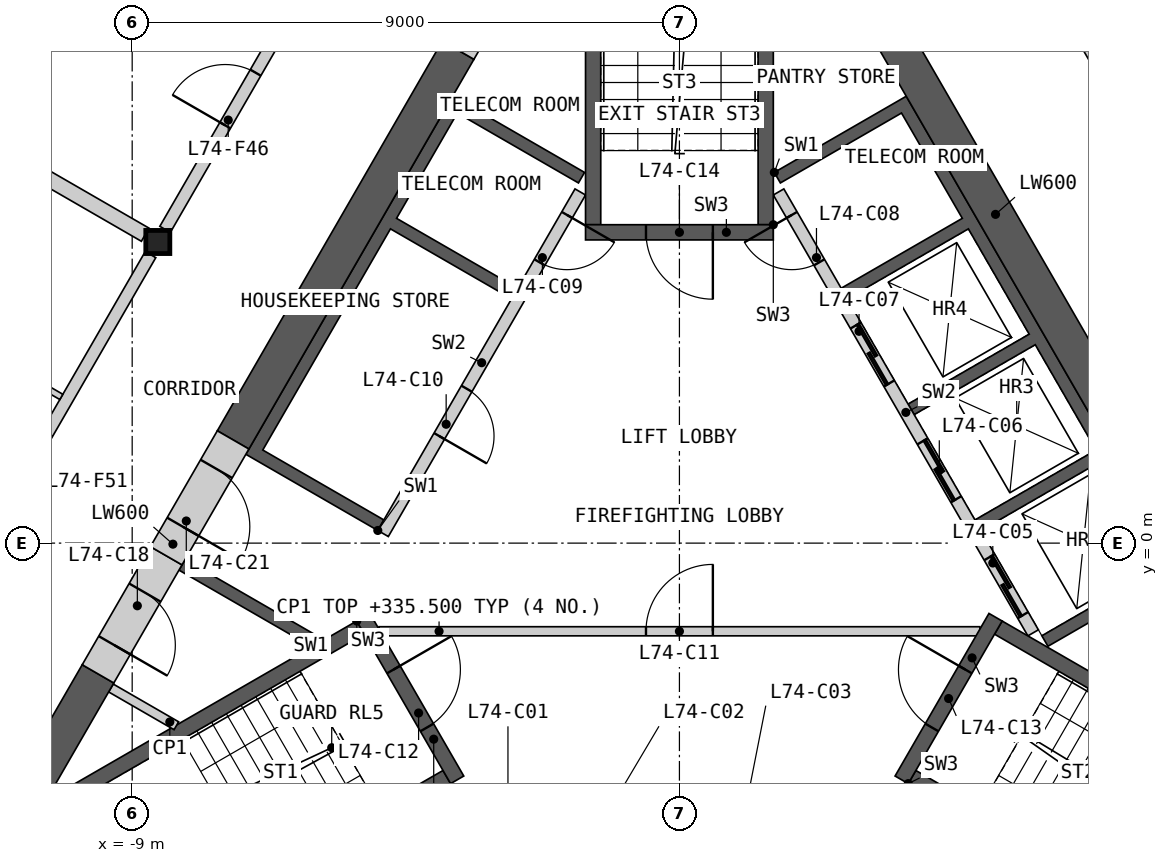
"""IFC4 building model, lengths in metres.
Left out: names, types, materials, properties, quantities, classifications, styles, units other than length and angle.
Written with IfcOpenShell. Run it as: python <this file> out.ifc"""

import sys

from ifc_helpers import new_model, si_unit, direction, frame, frame_2d, origin, origin_2d, place, context, subcontext, project, spatial, polyline, rectangle, i_section, outline, extrude, element, fill, save


model = new_model("IFC4")
c1 = context("Model", 3, precision=1e-05, world=origin(), true_north=direction((0.0, 1.0)))
c2 = subcontext(c1, "Body", "Model", "MODEL_VIEW")
j1 = project(units=[si_unit("LENGTHUNIT", "METRE"), si_unit("PLANEANGLEUNIT", "RADIAN")], contexts=[c1])
p1 = place(None, origin())
s1 = spatial("IfcSite", under=j1, at=p1, CompositionType="ELEMENT")
p2 = place(p1, origin())
s2 = spatial("IfcBuilding", under=s1, at=p2, CompositionType="ELEMENT")
p3 = place(p2, frame((0.0, 0.0, 332.4)))
s3 = spatial("IfcBuildingStorey", under=s2, at=p3, CompositionType="ELEMENT", Elevation=332.4)
p4 = place(p3, frame((-8.578, 4.953, 0.0), z_axis=(0.0, 0.0, 1.0), x_axis=(1.0, 0.0, 0.0)))
e1 = element("IfcColumn", 1, at=p4, inside=s3, PredefinedType="COLUMN", context=c2, shape_type="SweptSolid", body=[
    extrude(i_section(OverallWidth=0.396, OverallDepth=0.381, WebThickness=0.019, FlangeThickness=0.03, at=origin_2d()), origin(), (0.0, 0.0, 1.0), 3.4),
])
p5 = place(p3, origin())
e2 = element("IfcWall", 2, at=p5, inside=s3, PredefinedType="SHEAR", context=c2, shape_type="SweptSolid", body=[
    extrude(outline(polyline([(1.561, 6.097), (3.731, 7.35), (8.231, -0.444), (6.061, -1.697), (5.96, -1.524), (7.952, -0.374), (6.952, 1.358), (4.96, 0.208), (4.861, 0.381), (6.852, 1.531), (5.852, 3.263), (3.861, 2.113), (3.76, 2.287), (5.752, 3.437), (4.752, 5.169), (2.76, 4.019), (2.66, 4.192), (4.652, 5.342), (3.652, 7.074), (1.66, 5.924), (1.561, 6.097)])), origin(), (0.0, 0.0, 1.0), 3.1),
])
p6 = place(p3, frame((5.817, -1.476, 0.0), z_axis=(0.0, 0.0, 1.0), x_axis=(-0.500002616675, 0.866023893041, 0.0)))
e3 = element("IfcWall", 3, at=p6, inside=s3, PredefinedType="SOLIDWALL", context=c2, shape_type="SweptSolid", body=[
    extrude(rectangle(XDim=8.373, YDim=0.2, at=frame_2d((4.187, 0.0))), origin(), (0.0, 0.0, 1.0), 3.1),
])
p7 = place(p6, frame((0.337, 0.0, 0.0)))
e4 = element("IfcOpeningElement", 4, at=p7, cuts=e3, PredefinedType="OPENING", context=c2, shape_type="SweptSolid", body=[
    extrude(rectangle(XDim=1.1, YDim=2.1, at=frame_2d((0.55, 1.05))), frame((0.0, 0.11, 0.0), z_axis=(0.0, -1.0, 0.0), x_axis=(1.0, 0.0, 0.0)), (0.0, 0.0, 1.0), 0.22),
])
p8 = place(p6, frame((2.537, 0.0, 0.0)))
e5 = element("IfcOpeningElement", 5, at=p8, cuts=e3, PredefinedType="OPENING", context=c2, shape_type="SweptSolid", body=[
    extrude(rectangle(XDim=1.1, YDim=2.1, at=frame_2d((0.55, 1.05))), frame((0.0, 0.11, 0.0), z_axis=(0.0, -1.0, 0.0), x_axis=(1.0, 0.0, 0.0)), (0.0, 0.0, 1.0), 0.22),
])
p9 = place(p6, frame((4.737, 0.0, 0.0)))
e6 = element("IfcOpeningElement", 6, at=p9, cuts=e3, PredefinedType="OPENING", context=c2, shape_type="SweptSolid", body=[
    extrude(rectangle(XDim=1.1, YDim=2.1, at=frame_2d((0.55, 1.05))), frame((0.0, 0.11, 0.0), z_axis=(0.0, -1.0, 0.0), x_axis=(1.0, 0.0, 0.0)), (0.0, 0.0, 1.0), 0.22),
])
p10 = place(p6, frame((7.037, 0.0, 0.0)))
e7 = element("IfcOpeningElement", 7, at=p10, cuts=e3, PredefinedType="OPENING", context=c2, shape_type="SweptSolid", body=[
    extrude(rectangle(XDim=0.9, YDim=2.1, at=frame_2d((0.45, 1.05))), frame((0.0, 0.11, 0.0), z_axis=(0.0, -1.0, 0.0), x_axis=(1.0, 0.0, 0.0)), (0.0, 0.0, 1.0), 0.22),
])
p11 = place(p3, origin())
e8 = element("IfcWall", 8, at=p11, inside=s3, PredefinedType="SHEAR", context=c2, shape_type="SweptSolid", body=[
    extrude(outline(polyline([(-6.061, -1.697), (-8.231, -0.444), (-8.131, -0.271), (-5.96, -1.524), (-6.061, -1.697)])), origin(), (0.0, 0.0, 1.0), 3.1),
])
p12 = place(p3, origin())
e9 = element("IfcWall", 9, at=p12, inside=s3, PredefinedType="SHEAR", context=c2, shape_type="SweptSolid", body=[
    extrude(outline(polyline([(-4.96, 0.208), (-7.131, 1.461), (-3.731, 7.35), (-1.561, 6.097), (-1.66, 5.924), (-3.652, 7.074), (-4.652, 5.342), (-2.66, 4.192), (-2.76, 4.019), (-4.752, 5.169), (-6.852, 1.531), (-4.861, 0.381), (-4.96, 0.208)])), origin(), (0.0, 0.0, 1.0), 3.1),
])
p13 = place(p3, frame((-1.631, 5.776, 0.0), z_axis=(0.0, 0.0, 1.0), x_axis=(-0.499992876559, -0.866029516466, 0.0)))
e10 = element("IfcWall", 10, at=p13, inside=s3, PredefinedType="SOLIDWALL", context=c2, shape_type="SweptSolid", body=[
    extrude(rectangle(XDim=6.486, YDim=0.2, at=frame_2d((3.243, 0.0))), origin(), (0.0, 0.0, 1.0), 3.1),
])
p14 = place(p13, frame((0.437, 0.0, 0.0)))
e11 = element("IfcOpeningElement", 11, at=p14, cuts=e10, PredefinedType="OPENING", context=c2, shape_type="SweptSolid", body=[
    extrude(rectangle(XDim=0.9, YDim=2.1, at=frame_2d((0.45, 1.05))), frame((0.0, 0.11, 0.0), z_axis=(0.0, -1.0, 0.0), x_axis=(1.0, 0.0, 0.0)), (0.0, 0.0, 1.0), 0.22),
])
p15 = place(p13, frame((3.737, 0.0, 0.0)))
e12 = element("IfcOpeningElement", 12, at=p15, cuts=e10, PredefinedType="OPENING", context=c2, shape_type="SweptSolid", body=[
    extrude(rectangle(XDim=0.9, YDim=2.1, at=frame_2d((0.45, 1.05))), frame((0.0, 0.11, 0.0), z_axis=(0.0, -1.0, 0.0), x_axis=(1.0, 0.0, 0.0)), (0.0, 0.0, 1.0), 0.22),
])
p16 = place(p3, frame((-4.941, -1.45, 0.0), z_axis=(0.0, 0.0, 1.0), x_axis=(1.0, 0.0, 0.0)))
e13 = element("IfcWall", 13, at=p16, inside=s3, PredefinedType="PARTITIONING", context=c2, shape_type="SweptSolid", body=[
    extrude(rectangle(XDim=9.882, YDim=0.15, at=frame_2d((4.941, 0.0))), origin(), (0.0, 0.0, 1.0), 3.1),
])
p17 = place(p16, frame((4.391, 0.0, 0.0)))
e14 = element("IfcOpeningElement", 14, at=p17, cuts=e13, PredefinedType="OPENING", context=c2, shape_type="SweptSolid", body=[
    extrude(rectangle(XDim=1.1, YDim=2.1, at=frame_2d((0.55, 1.05))), frame((0.0, 0.085, 0.0), z_axis=(0.0, -1.0, 0.0), x_axis=(1.0, 0.0, 0.0)), (0.0, 0.0, 1.0), 0.17),
])
p18 = place(p3, origin())
e15 = element("IfcWall", 15, at=p18, inside=s3, PredefinedType="SHEAR", context=c2, shape_type="SweptSolid", body=[
    extrude(outline(polyline([(-5.307, -1.281), (-10.374, -4.206), (-10.032, -4.298), (-5.182, -1.498), (-5.307, -1.281)])), origin(), (0.0, 0.0, 1.0), 3.1),
])
p19 = place(p3, origin())
e16 = element("IfcWall", 16, at=p19, inside=s3, PredefinedType="SHEAR", context=c2, shape_type="SweptSolid", body=[
    extrude(outline(polyline([(-8.738, -6.539), (-8.83, -6.881), (-3.763, -3.956), (-3.888, -3.739), (-8.738, -6.539)])), origin(), (0.0, 0.0, 1.0), 3.1),
])
p20 = place(p3, frame((-5.199, -1.219, 0.0), z_axis=(0.0, 0.0, 1.0), x_axis=(0.499982516597, -0.866035497597, 0.0)))
e17 = element("IfcWall", 17, at=p20, inside=s3, PredefinedType="SHEAR", context=c2, shape_type="SweptSolid", body=[
    extrude(rectangle(XDim=3.088, YDim=0.25, at=frame_2d((1.544, 0.0))), origin(), (0.0, 0.0, 1.0), 3.1),
])
p21 = place(p20, frame((0.994, 0.0, 0.0)))
e18 = element("IfcOpeningElement", 18, at=p21, cuts=e17, PredefinedType="OPENING", context=c2, shape_type="SweptSolid", body=[
    extrude(rectangle(XDim=1.1, YDim=2.1, at=frame_2d((0.55, 1.05))), frame((0.0, 0.135, 0.0), z_axis=(0.0, -1.0, 0.0), x_axis=(1.0, 0.0, 0.0)), (0.0, 0.0, 1.0), 0.27),
])
p22 = place(p3, origin())
e19 = element("IfcWall", 19, at=p22, inside=s3, PredefinedType="SHEAR", context=c2, shape_type="SweptSolid", body=[
    extrude(outline(polyline([(3.763, -3.956), (8.83, -6.881), (8.738, -6.539), (3.888, -3.739), (3.763, -3.956)])), origin(), (0.0, 0.0, 1.0), 3.1),
])
p23 = place(p3, origin())
e20 = element("IfcWall", 20, at=p23, inside=s3, PredefinedType="SHEAR", context=c2, shape_type="SweptSolid", body=[
    extrude(outline(polyline([(10.032, -4.298), (10.374, -4.206), (5.307, -1.281), (5.182, -1.498), (10.032, -4.298)])), origin(), (0.0, 0.0, 1.0), 3.1),
])
p24 = place(p3, frame((3.655, -3.893, 0.0), z_axis=(0.0, 0.0, 1.0), x_axis=(0.499982516597, 0.866035497597, 0.0)))
e21 = element("IfcWall", 21, at=p24, inside=s3, PredefinedType="SHEAR", context=c2, shape_type="SweptSolid", body=[
    extrude(rectangle(XDim=3.088, YDim=0.25, at=frame_2d((1.544, 0.0))), origin(), (0.0, 0.0, 1.0), 3.1),
])
p25 = place(p24, frame((0.994, 0.0, 0.0)))
e22 = element("IfcOpeningElement", 22, at=p25, cuts=e21, PredefinedType="OPENING", context=c2, shape_type="SweptSolid", body=[
    extrude(rectangle(XDim=1.1, YDim=2.1, at=frame_2d((0.55, 1.05))), frame((0.0, 0.135, 0.0), z_axis=(0.0, -1.0, 0.0), x_axis=(1.0, 0.0, 0.0)), (0.0, 0.0, 1.0), 0.27),
])
p26 = place(p3, origin())
e23 = element("IfcWall", 23, at=p26, inside=s3, PredefinedType="SHEAR", context=c2, shape_type="SweptSolid", body=[
    extrude(outline(polyline([(1.544, 5.237), (1.544, 11.087), (1.294, 10.837), (1.294, 5.237), (1.544, 5.237)])), origin(), (0.0, 0.0, 1.0), 3.1),
])
p27 = place(p3, origin())
e24 = element("IfcWall", 24, at=p27, inside=s3, PredefinedType="SHEAR", context=c2, shape_type="SweptSolid", body=[
    extrude(outline(polyline([(-1.294, 10.837), (-1.544, 11.087), (-1.544, 5.237), (-1.294, 5.237), (-1.294, 10.837)])), origin(), (0.0, 0.0, 1.0), 3.1),
])
p28 = place(p3, frame((1.544, 5.112, 0.0), z_axis=(0.0, 0.0, 1.0), x_axis=(-1.0, 0.0, 0.0)))
e25 = element("IfcWall", 25, at=p28, inside=s3, PredefinedType="SHEAR", context=c2, shape_type="SweptSolid", body=[
    extrude(rectangle(XDim=3.088, YDim=0.25, at=frame_2d((1.544, 0.0))), origin(), (0.0, 0.0, 1.0), 3.1),
])
p29 = place(p28, frame((0.994, 0.0, 0.0)))
e26 = element("IfcOpeningElement", 26, at=p29, cuts=e25, PredefinedType="OPENING", context=c2, shape_type="SweptSolid", body=[
    extrude(rectangle(XDim=1.1, YDim=2.1, at=frame_2d((0.55, 1.05))), frame((0.0, 0.135, 0.0), z_axis=(0.0, -1.0, 0.0), x_axis=(1.0, 0.0, 0.0)), (0.0, 0.0, 1.0), 0.27),
])
p30 = place(p3, frame((-9.35, -2.383, 0.0), z_axis=(0.0, 0.0, 1.0), x_axis=(0.866057962423, -0.499943602543, 0.0)))
e27 = element("IfcWall", 27, at=p30, inside=s3, PredefinedType="PARTITIONING", context=c2, shape_type="SweptSolid", body=[
    extrude(rectangle(XDim=1.242, YDim=0.15, at=frame_2d((0.621, 0.0))), origin(), (0.0, 0.0, 1.0), 3.1),
])
p31 = place(p3, frame((8.841, -0.902, 0.0), z_axis=(0.0, 0.0, 1.0), x_axis=(-0.499995618375, 0.866027933502, 0.0)))
e28 = element("IfcWall", 28, at=p31, inside=s3, PredefinedType="SHEAR", context=c2, shape_type="SweptSolid", body=[
    extrude(rectangle(XDim=14.571, YDim=0.6, at=frame_2d((7.285, 0.0))), origin(), (0.0, 0.0, 1.0), 3.1),
])
p32 = place(p3, frame((-3.639, 8.107, 0.0), z_axis=(0.0, 0.0, 1.0), x_axis=(-0.49999180351, -0.866030135978, 0.0)))
e29 = element("IfcWall", 29, at=p32, inside=s3, PredefinedType="SHEAR", context=c2, shape_type="SweptSolid", body=[
    extrude(rectangle(XDim=7.401, YDim=0.6, at=frame_2d((3.701, 0.0))), origin(), (0.0, 0.0, 1.0), 3.1),
])
p33 = place(p3, frame((-9.562, -2.15, 0.0), z_axis=(0.0, 0.0, 1.0), x_axis=(-0.500015214976, -0.866016619236, 0.0)))
e30 = element("IfcWall", 30, at=p33, inside=s3, PredefinedType="SHEAR", context=c2, shape_type="SweptSolid", body=[
    extrude(rectangle(XDim=5.318, YDim=0.6, at=frame_2d((2.659, 0.0))), origin(), (0.0, 0.0, 1.0), 3.1),
])
p34 = place(p3, frame((-8.44, -0.208, 0.0), z_axis=(0.0, 0.0, 1.0), x_axis=(-0.500001951578, -0.866024277037, 0.0)))
e31 = element("IfcWall", 31, at=p34, inside=s3, PredefinedType="SHEAR", context=c2, shape_type="SweptSolid", body=[
    extrude(rectangle(XDim=2.243, YDim=0.6, at=frame_2d((1.122, 0.0))), origin(), (0.0, 0.0, 1.0), 3.1),
])
p35 = place(p34, frame((0.7, 0.0, 0.0)))
e32 = element("IfcOpeningElement", 32, at=p35, cuts=e31, PredefinedType="OPENING", context=c2, shape_type="SweptSolid", body=[
    extrude(rectangle(XDim=1.0, YDim=2.1, at=frame_2d((0.5, 1.05))), frame((0.0, 0.31, 0.0), z_axis=(0.0, -1.0, 0.0), x_axis=(1.0, 0.0, 0.0)), (0.0, 0.0, 1.0), 0.62),
])
p36 = place(p3, frame((-2.539, 10.013, 0.0), z_axis=(0.0, 0.0, 1.0), x_axis=(-0.50002983664, -0.866008176907, 0.0)))
e33 = element("IfcWall", 33, at=p36, inside=s3, PredefinedType="SHEAR", context=c2, shape_type="SweptSolid", body=[
    extrude(rectangle(XDim=2.2, YDim=0.6, at=frame_2d((1.1, 0.0))), origin(), (0.0, 0.0, 1.0), 3.1),
])
p37 = place(p36, frame((0.6, 0.0, 0.0)))
e34 = element("IfcOpeningElement", 34, at=p37, cuts=e33, PredefinedType="OPENING", context=c2, shape_type="SweptSolid", body=[
    extrude(rectangle(XDim=1.0, YDim=2.1, at=frame_2d((0.5, 1.05))), frame((0.0, 0.31, 0.0), z_axis=(0.0, -1.0, 0.0), x_axis=(1.0, 0.0, 0.0)), (0.0, 0.0, 1.0), 0.62),
])
p38 = place(p3, frame((-7.34, 1.698, 0.0), z_axis=(0.0, 0.0, 1.0), x_axis=(-0.50002983664, -0.866008176907, 0.0)))
e35 = element("IfcWall", 35, at=p38, inside=s3, PredefinedType="SHEAR", context=c2, shape_type="SweptSolid", body=[
    extrude(rectangle(XDim=2.2, YDim=0.6, at=frame_2d((1.1, 0.0))), origin(), (0.0, 0.0, 1.0), 3.1),
])
p39 = place(p38, frame((0.55, 0.0, 0.0)))
e36 = element("IfcOpeningElement", 36, at=p39, cuts=e35, PredefinedType="OPENING", context=c2, shape_type="SweptSolid", body=[
    extrude(rectangle(XDim=1.1, YDim=2.1, at=frame_2d((0.55, 1.05))), frame((0.0, 0.31, 0.0), z_axis=(0.0, -1.0, 0.0), x_axis=(1.0, 0.0, 0.0)), (0.0, 0.0, 1.0), 0.62),
])
p40 = place(p3, frame((-19.615, 11.325, 0.0), z_axis=(0.0, 0.0, 1.0), x_axis=(0.86602139559, -0.500006942333, 0.0)))
e37 = element("IfcWall", 37, at=p40, inside=s3, PredefinedType="PARTITIONING", context=c2, shape_type="SweptSolid", body=[
    extrude(rectangle(XDim=12.505, YDim=0.25, at=frame_2d((6.252, 0.0))), origin(), (0.0, 0.0, 1.0), 2.33),
])
p41 = place(p3, frame((4.409, 12.174, 0.0), z_axis=(0.0, 0.0, 1.0), x_axis=(0.499984266882, -0.866034487114, 0.0)))
e38 = element("IfcWall", 38, at=p41, inside=s3, PredefinedType="PARTITIONING", context=c2, shape_type="SweptSolid", body=[
    extrude(rectangle(XDim=8.099, YDim=0.2, at=frame_2d((4.049, 0.0))), origin(), (0.0, 0.0, 1.0), 3.1),
])
p42 = place(p41, frame((1.164, 0.0, 0.0)))
e39 = element("IfcOpeningElement", 39, at=p42, cuts=e38, PredefinedType="OPENING", context=c2, shape_type="SweptSolid", body=[
    extrude(rectangle(XDim=1.0, YDim=2.1, at=frame_2d((0.5, 1.05))), frame((0.0, 0.11, 0.0), z_axis=(0.0, -1.0, 0.0), x_axis=(1.0, 0.0, 0.0)), (0.0, 0.0, 1.0), 0.22),
])
p43 = place(p3, frame((-8.458, 5.16, 0.0), z_axis=(0.0, 0.0, 1.0), x_axis=(0.499984266882, 0.866034487114, 0.0)))
e40 = element("IfcWall", 40, at=p43, inside=s3, PredefinedType="PARTITIONING", context=c2, shape_type="SweptSolid", body=[
    extrude(rectangle(XDim=8.099, YDim=0.2, at=frame_2d((4.049, 0.0))), origin(), (0.0, 0.0, 1.0), 3.1),
])
p44 = place(p43, frame((1.976, 0.0, 0.0)))
e41 = element("IfcOpeningElement", 41, at=p44, cuts=e40, PredefinedType="OPENING", context=c2, shape_type="SweptSolid", body=[
    extrude(rectangle(XDim=1.0, YDim=2.1, at=frame_2d((0.5, 1.05))), frame((0.0, 0.11, 0.0), z_axis=(0.0, -1.0, 0.0), x_axis=(1.0, 0.0, 0.0)), (0.0, 0.0, 1.0), 0.22),
])
p45 = place(p3, frame((-12.748, -2.269, 0.0), z_axis=(0.0, 0.0, 1.0), x_axis=(0.499984266882, 0.866034487114, 0.0)))
e42 = element("IfcWall", 42, at=p45, inside=s3, PredefinedType="PARTITIONING", context=c2, shape_type="SweptSolid", body=[
    extrude(rectangle(XDim=8.099, YDim=0.2, at=frame_2d((4.049, 0.0))), origin(), (0.0, 0.0, 1.0), 3.1),
])
p46 = place(p45, frame((3.702, 0.0, 0.0)))
e43 = element("IfcOpeningElement", 43, at=p46, cuts=e42, PredefinedType="OPENING", context=c2, shape_type="SweptSolid", body=[
    extrude(rectangle(XDim=1.0, YDim=2.1, at=frame_2d((0.5, 1.05))), frame((0.0, 0.11, 0.0), z_axis=(0.0, -1.0, 0.0), x_axis=(1.0, 0.0, 0.0)), (0.0, 0.0, 1.0), 0.22),
])
p47 = place(p3, frame((-15.318, 5.38, 0.0), z_axis=(0.0, 0.0, 1.0), x_axis=(0.866035260786, -0.499982926783, 0.0)))
e44 = element("IfcWall", 44, at=p47, inside=s3, PredefinedType="PARTITIONING", context=c2, shape_type="SweptSolid", body=[
    extrude(rectangle(XDim=5.95, YDim=0.1, at=frame_2d((2.975, 0.0))), origin(), (0.0, 0.0, 1.0), 2.33),
])
p48 = place(p7, origin())
e45 = element("IfcDoor", 45, at=p48, inside=s3, OperationType="SLIDING_TO_LEFT", PredefinedType="DOOR", context=c2, shape_type="SweptSolid", body=[
    extrude(rectangle(XDim=1.1, YDim=2.1, at=frame_2d((0.55, 1.05))), frame((0.0, 0.025, 0.0), z_axis=(0.0, -1.0, 0.0), x_axis=(1.0, 0.0, 0.0)), (0.0, 0.0, 1.0), 0.05),
])
fill(e4, e45)
p49 = place(p8, origin())
e46 = element("IfcDoor", 46, at=p49, inside=s3, OperationType="SLIDING_TO_LEFT", PredefinedType="DOOR", context=c2, shape_type="SweptSolid", body=[
    extrude(rectangle(XDim=1.1, YDim=2.1, at=frame_2d((0.55, 1.05))), frame((0.0, 0.025, 0.0), z_axis=(0.0, -1.0, 0.0), x_axis=(1.0, 0.0, 0.0)), (0.0, 0.0, 1.0), 0.05),
])
fill(e5, e46)
p50 = place(p9, origin())
e47 = element("IfcDoor", 47, at=p50, inside=s3, OperationType="SLIDING_TO_LEFT", PredefinedType="DOOR", context=c2, shape_type="SweptSolid", body=[
    extrude(rectangle(XDim=1.1, YDim=2.1, at=frame_2d((0.55, 1.05))), frame((0.0, 0.025, 0.0), z_axis=(0.0, -1.0, 0.0), x_axis=(1.0, 0.0, 0.0)), (0.0, 0.0, 1.0), 0.05),
])
fill(e6, e47)
p51 = place(p10, origin())
e48 = element("IfcDoor", 48, at=p51, inside=s3, OperationType="SINGLE_SWING_RIGHT", PredefinedType="DOOR", context=c2, shape_type="SweptSolid", body=[
    extrude(rectangle(XDim=0.9, YDim=2.1, at=frame_2d((0.45, 1.05))), frame((0.0, 0.025, 0.0), z_axis=(0.0, -1.0, 0.0), x_axis=(1.0, 0.0, 0.0)), (0.0, 0.0, 1.0), 0.05),
])
fill(e7, e48)
p52 = place(p14, origin())
e49 = element("IfcDoor", 49, at=p52, inside=s3, OperationType="SINGLE_SWING_LEFT", PredefinedType="DOOR", context=c2, shape_type="SweptSolid", body=[
    extrude(rectangle(XDim=0.9, YDim=2.1, at=frame_2d((0.45, 1.05))), frame((0.0, 0.025, 0.0), z_axis=(0.0, -1.0, 0.0), x_axis=(1.0, 0.0, 0.0)), (0.0, 0.0, 1.0), 0.05),
])
fill(e11, e49)
p53 = place(p15, origin())
e50 = element("IfcDoor", 50, at=p53, inside=s3, OperationType="SINGLE_SWING_RIGHT", PredefinedType="DOOR", context=c2, shape_type="SweptSolid", body=[
    extrude(rectangle(XDim=0.9, YDim=2.1, at=frame_2d((0.45, 1.05))), frame((0.0, 0.025, 0.0), z_axis=(0.0, -1.0, 0.0), x_axis=(1.0, 0.0, 0.0)), (0.0, 0.0, 1.0), 0.05),
])
fill(e12, e50)
p54 = place(p17, origin())
e51 = element("IfcDoor", 51, at=p54, inside=s3, OperationType="SINGLE_SWING_RIGHT", PredefinedType="DOOR", context=c2, shape_type="SweptSolid", body=[
    extrude(rectangle(XDim=1.1, YDim=2.1, at=frame_2d((0.55, 1.05))), frame((0.0, 0.025, 0.0), z_axis=(0.0, -1.0, 0.0), x_axis=(1.0, 0.0, 0.0)), (0.0, 0.0, 1.0), 0.05),
])
fill(e14, e51)
p55 = place(p21, origin())
e52 = element("IfcDoor", 52, at=p55, inside=s3, OperationType="SINGLE_SWING_LEFT", PredefinedType="DOOR", context=c2, shape_type="SweptSolid", body=[
    extrude(rectangle(XDim=1.1, YDim=2.1, at=frame_2d((0.55, 1.05))), frame((0.0, 0.025, 0.0), z_axis=(0.0, -1.0, 0.0), x_axis=(1.0, 0.0, 0.0)), (0.0, 0.0, 1.0), 0.05),
])
fill(e18, e52)
p56 = place(p25, origin())
e53 = element("IfcDoor", 53, at=p56, inside=s3, OperationType="SINGLE_SWING_RIGHT", PredefinedType="DOOR", context=c2, shape_type="SweptSolid", body=[
    extrude(rectangle(XDim=1.1, YDim=2.1, at=frame_2d((0.55, 1.05))), frame((0.0, 0.025, 0.0), z_axis=(0.0, -1.0, 0.0), x_axis=(1.0, 0.0, 0.0)), (0.0, 0.0, 1.0), 0.05),
])
fill(e22, e53)
p57 = place(p29, origin())
e54 = element("IfcDoor", 54, at=p57, inside=s3, OperationType="SINGLE_SWING_LEFT", PredefinedType="DOOR", context=c2, shape_type="SweptSolid", body=[
    extrude(rectangle(XDim=1.1, YDim=2.1, at=frame_2d((0.55, 1.05))), frame((0.0, 0.025, 0.0), z_axis=(0.0, -1.0, 0.0), x_axis=(1.0, 0.0, 0.0)), (0.0, 0.0, 1.0), 0.05),
])
fill(e26, e54)
p58 = place(p35, origin())
e55 = element("IfcDoor", 55, at=p58, inside=s3, OperationType="SINGLE_SWING_RIGHT", PredefinedType="DOOR", context=c2, shape_type="SweptSolid", body=[
    extrude(rectangle(XDim=1.0, YDim=2.1, at=frame_2d((0.5, 1.05))), frame((0.0, 0.055, 0.0), z_axis=(0.0, -1.0, 0.0), x_axis=(1.0, 0.0, 0.0)), (0.0, 0.0, 1.0), 0.05),
])
fill(e32, e55)
p59 = place(p39, origin())
e56 = element("IfcDoor", 56, at=p59, inside=s3, OperationType="SINGLE_SWING_RIGHT", PredefinedType="DOOR", context=c2, shape_type="SweptSolid", body=[
    extrude(rectangle(XDim=1.1, YDim=2.1, at=frame_2d((0.55, 1.05))), frame((0.0, 0.055, 0.0), z_axis=(0.0, -1.0, 0.0), x_axis=(1.0, 0.0, 0.0)), (0.0, 0.0, 1.0), 0.05),
])
fill(e36, e56)
p60 = place(p44, origin())
e57 = element("IfcDoor", 57, at=p60, inside=s3, OperationType="SINGLE_SWING_LEFT", PredefinedType="DOOR", context=c2, shape_type="SweptSolid", body=[
    extrude(rectangle(XDim=1.0, YDim=2.1, at=frame_2d((0.5, 1.05))), frame((0.0, 0.025, 0.0), z_axis=(0.0, -1.0, 0.0), x_axis=(1.0, 0.0, 0.0)), (0.0, 0.0, 1.0), 0.05),
])
fill(e41, e57)
save(model, sys.argv[1])
